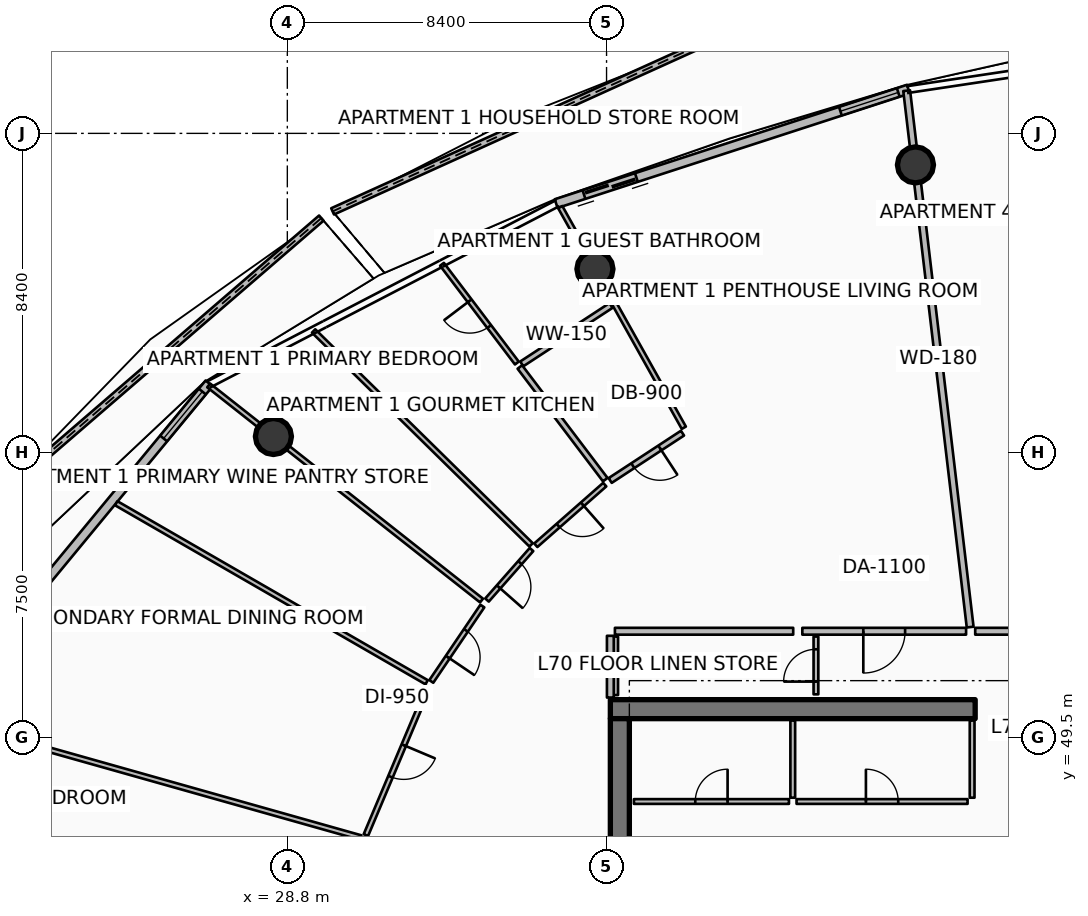
"""IFC4 building model, lengths in metres.
Left out: names, types, materials, properties, quantities, classifications, styles, units other than length and angle.
Written with IfcOpenShell. Run it as: python <this file> out.ifc"""

import sys

from ifc_helpers import new_model, si_unit, direction, frame, frame_2d, origin, origin_2d, place, context, subcontext, project, spatial, polyline, rectangle, circle, outline, extrude, element, fill, save


model = new_model("IFC4")
c1 = context("Model", 3, precision=1e-05, world=origin(), true_north=direction((0.0, 1.0)))
c2 = subcontext(c1, "Body", "Model", "MODEL_VIEW")
j1 = project(units=[si_unit("LENGTHUNIT", "METRE"), si_unit("PLANEANGLEUNIT", "RADIAN")], contexts=[c1])
p1 = place(None, origin())
s1 = spatial("IfcSite", under=j1, at=p1, CompositionType="ELEMENT")
p2 = place(p1, origin())
s2 = spatial("IfcBuilding", under=s1, at=p2, CompositionType="ELEMENT")
p3 = place(p2, frame((0.0, 0.0, 279.05)))
s3 = spatial("IfcBuildingStorey", under=s2, at=p3, CompositionType="ELEMENT", Elevation=279.05)
p4 = place(p3, frame((37.3, 50.25, 0.0), z_axis=(0.0, 0.0, 1.0), x_axis=(1.0, 0.0, 0.0)))
e1 = element("IfcWall", 1, at=p4, inside=s3, PredefinedType="SHEAR", context=c2, shape_type="SweptSolid", body=[
    extrude(rectangle(XDim=9.6, YDim=0.5, at=frame_2d((4.8, 0.0))), origin(), (0.0, 0.0, 1.0), 3.85),
])
p5 = place(p3, frame((37.55, 34.0, 0.0), z_axis=(0.0, 0.0, 1.0), x_axis=(0.0, 1.0, 0.0)))
e2 = element("IfcWall", 2, at=p5, inside=s3, PredefinedType="SHEAR", context=c2, shape_type="SweptSolid", body=[
    extrude(rectangle(XDim=16.0, YDim=0.5, at=frame_2d((8.0, 0.0))), origin(), (0.0, 0.0, 1.0), 3.85),
])
for number, where, z_axis, x_axis in (
    (3, (45.329, 64.571, 0.0), (0.0, 0.0, 1.0), (1.0, 0.0, 0.0)),
    (4, (36.895, 61.83, 0.0), (0.0, 0.0, 1.0), (1.0, 0.0, 0.0)),
    (5, (28.434, 57.425, 0.0), (0.0, 0.0, 1.0), (1.0, 0.0, 0.0)),
):
    element("IfcColumn", number, at=place(p3, frame(where, z_axis=z_axis, x_axis=x_axis)), inside=s3, PredefinedType="COLUMN", context=c2, shape_type="SweptSolid", body=[
        extrude(circle(Radius=0.475, at=origin_2d()), origin(), (0.0, 0.0, 1.0), 3.59),
    ])
p6 = place(p3, frame((39.534, 67.67, 0.0), z_axis=(0.0, 0.0, 1.0), x_axis=(-0.910900469726, -0.412626143444, 0.0)))
e6 = element("IfcWall", 6, at=p6, inside=s3, PredefinedType="PARAPET", context=c2, shape_type="SweptSolid", body=[
    extrude(outline(polyline([(0.0, 0.0), (10.476, 0.0), (10.476, 1.497), (5.238, 1.696), (0.0, 1.832), (0.0, 0.0)])), frame((0.0, 0.09, 0.0), z_axis=(0.0, -1.0, 0.0), x_axis=(1.0, 0.0, 0.0)), (0.0, 0.0, 1.0), 0.18),
])
p7 = place(p3, frame((29.694, 63.17, 0.0), z_axis=(0.0, 0.0, 1.0), x_axis=(-0.757188428153, -0.653196512751, 0.0)))
e7 = element("IfcWall", 7, at=p7, inside=s3, PredefinedType="PARAPET", context=c2, shape_type="SweptSolid", body=[
    extrude(outline(polyline([(0.0, 0.0), (11.278, 0.0), (11.278, 1.148), (5.639, 1.284), (0.0, 1.483), (0.0, 0.0)])), frame((0.0, 0.09, 0.0), z_axis=(0.0, -1.0, 0.0), x_axis=(1.0, 0.0, 0.0)), (0.0, 0.0, 1.0), 0.18),
])
p8 = place(p3, frame((45.142, 66.564, 0.0), z_axis=(0.0, 0.0, 1.0), x_axis=(-0.951055974609, -0.309018661507, 0.0)))
e8 = element("IfcWall", 8, at=p8, inside=s3, PredefinedType="SOLIDWALL", context=c2, shape_type="SweptSolid", body=[
    extrude(rectangle(XDim=9.745, YDim=0.24, at=frame_2d((4.873, 0.0))), origin(), (0.0, 0.0, 1.0), 2.54),
])
p9 = place(p8, frame((7.525, 0.0, 0.0)))
e9 = element("IfcOpeningElement", 9, at=p9, cuts=e8, PredefinedType="OPENING", context=c2, shape_type="SweptSolid", body=[
    extrude(rectangle(XDim=1.45, YDim=2.15, at=frame_2d((0.725, 1.075))), frame((0.0, 0.13, 0.0), z_axis=(0.0, -1.0, 0.0), x_axis=(1.0, 0.0, 0.0)), (0.0, 0.0, 1.0), 0.26),
])
p10 = place(p8, frame((0.28, 0.0, 0.65)))
e10 = element("IfcOpeningElement", 10, at=p10, cuts=e8, PredefinedType="OPENING", context=c2, shape_type="SweptSolid", body=[
    extrude(rectangle(XDim=1.6, YDim=1.5, at=frame_2d((0.8, 0.75))), frame((0.0, 0.13, 0.0), z_axis=(0.0, -1.0, 0.0), x_axis=(1.0, 0.0, 0.0)), (0.0, 0.0, 1.0), 0.26),
])
p11 = place(p3, frame((26.742, 58.822, 0.0), z_axis=(0.0, 0.0, 1.0), x_axis=(-0.636680093065, -0.771128043255, 0.0)))
e11 = element("IfcWall", 11, at=p11, inside=s3, PredefinedType="SOLIDWALL", context=c2, shape_type="SweptSolid", body=[
    extrude(rectangle(XDim=11.438, YDim=0.24, at=frame_2d((5.719, 0.0))), origin(), (0.0, 0.0, 1.0), 2.54),
])
p12 = place(p11, frame((9.218, 0.0, 0.0)))
e12 = element("IfcOpeningElement", 12, at=p12, cuts=e11, PredefinedType="OPENING", context=c2, shape_type="SweptSolid", body=[
    extrude(rectangle(XDim=1.45, YDim=2.15, at=frame_2d((0.725, 1.075))), frame((0.0, 0.13, 0.0), z_axis=(0.0, -1.0, 0.0), x_axis=(1.0, 0.0, 0.0)), (0.0, 0.0, 1.0), 0.26),
])
p13 = place(p11, frame((0.28, 0.0, 0.65)))
e13 = element("IfcOpeningElement", 13, at=p13, cuts=e11, PredefinedType="OPENING", context=c2, shape_type="SweptSolid", body=[
    extrude(rectangle(XDim=1.6, YDim=1.5, at=frame_2d((0.8, 0.75))), frame((0.0, 0.13, 0.0), z_axis=(0.0, -1.0, 0.0), x_axis=(1.0, 0.0, 0.0)), (0.0, 0.0, 1.0), 0.26),
])
for number, where, z_axis, x_axis in (
    (14, (46.82, 47.92, 0.0), (0.0, 0.0, 1.0), (0.0, 1.0, 0.0)),
    (15, (42.1, 47.92, 0.0), (0.0, 0.0, 1.0), (0.0, 1.0, 0.0)),
):
    element("IfcWall", number, at=place(p3, frame(where, z_axis=z_axis, x_axis=x_axis)), inside=s3, PredefinedType="PARTITIONING", context=c2, shape_type="SweptSolid", body=[
        extrude(rectangle(XDim=2.03, YDim=0.125, at=frame_2d((1.015, 0.0))), origin(), (0.0, 0.0, 1.0), 3.03),
    ])
p14 = place(p3, frame((37.92, 47.82, 0.0), z_axis=(0.0, 0.0, 1.0), x_axis=(1.0, 0.0, 0.0)))
e16 = element("IfcWall", 16, at=p14, inside=s3, PredefinedType="PARTITIONING", context=c2, shape_type="SweptSolid", body=[
    extrude(rectangle(XDim=4.08, YDim=0.125, at=frame_2d((2.04, 0.0))), origin(), (0.0, 0.0, 1.0), 3.03),
])
p15 = place(p14, frame((1.615, 0.0, 0.0)))
e17 = element("IfcOpeningElement", 17, at=p15, cuts=e16, PredefinedType="OPENING", context=c2, shape_type="SweptSolid", body=[
    extrude(rectangle(XDim=0.85, YDim=2.06, at=frame_2d((0.425, 1.03))), frame((0.0, 0.073, 0.0), z_axis=(0.0, -1.0, 0.0), x_axis=(1.0, 0.0, 0.0)), (0.0, 0.0, 1.0), 0.145),
])
p16 = place(p3, frame((42.2, 47.82, 0.0), z_axis=(0.0, 0.0, 1.0), x_axis=(1.0, 0.0, 0.0)))
e18 = element("IfcWall", 18, at=p16, inside=s3, PredefinedType="PARTITIONING", context=c2, shape_type="SweptSolid", body=[
    extrude(rectangle(XDim=4.5, YDim=0.125, at=frame_2d((2.25, 0.0))), origin(), (0.0, 0.0, 1.0), 3.03),
])
p17 = place(p16, frame((1.825, 0.0, 0.0)))
e19 = element("IfcOpeningElement", 19, at=p17, cuts=e18, PredefinedType="OPENING", context=c2, shape_type="SweptSolid", body=[
    extrude(rectangle(XDim=0.85, YDim=2.06, at=frame_2d((0.425, 1.03))), frame((0.0, 0.073, 0.0), z_axis=(0.0, -1.0, 0.0), x_axis=(1.0, 0.0, 0.0)), (0.0, 0.0, 1.0), 0.145),
])
p18 = place(p3, frame((37.44, 50.62, 0.0), z_axis=(0.0, 0.0, 1.0), x_axis=(0.0, 1.0, 0.0)))
e20 = element("IfcWall", 20, at=p18, inside=s3, PredefinedType="PARTITIONING", context=c2, shape_type="SweptSolid", body=[
    extrude(rectangle(XDim=1.54, YDim=0.125, at=frame_2d((0.77, 0.0))), origin(), (0.0, 0.0, 1.0), 3.03),
])
p19 = place(p3, frame((42.71, 50.64, 0.0), z_axis=(0.0, 0.0, 1.0), x_axis=(0.0, 1.0, 0.0)))
e21 = element("IfcWall", 21, at=p19, inside=s3, PredefinedType="PARTITIONING", context=c2, shape_type="SweptSolid", body=[
    extrude(rectangle(XDim=1.52, YDim=0.125, at=frame_2d((0.76, 0.0))), origin(), (0.0, 0.0, 1.0), 2.957),
])
p20 = place(p19, frame((0.335, 0.0, 0.0)))
e22 = element("IfcOpeningElement", 22, at=p20, cuts=e21, PredefinedType="OPENING", context=c2, shape_type="SweptSolid", body=[
    extrude(rectangle(XDim=0.85, YDim=2.06, at=frame_2d((0.425, 1.03))), frame((0.0, 0.073, 0.0), z_axis=(0.0, -1.0, 0.0), x_axis=(1.0, 0.0, 0.0)), (0.0, 0.0, 1.0), 0.145),
])
p21 = place(p3, frame((46.768, 52.409, 0.0), z_axis=(0.0, 0.0, 1.0), x_axis=(-0.117545848714, 0.993067456646, 0.0)))
e23 = element("IfcWall", 23, at=p21, inside=s3, PredefinedType="PARTITIONING", context=c2, shape_type="SweptSolid", body=[
    extrude(rectangle(XDim=14.213, YDim=0.18, at=frame_2d((7.106, 0.0))), origin(), (0.0, 0.0, 1.0), 2.957),
])
p22 = place(p3, frame((46.661, 52.3, 0.0), z_axis=(0.0, 0.0, 1.0), x_axis=(-1.0, 0.0, 0.0)))
e24 = element("IfcWall", 24, at=p22, inside=s3, PredefinedType="PARTITIONING", context=c2, shape_type="SweptSolid", body=[
    extrude(rectangle(XDim=4.309, YDim=0.18, at=frame_2d((2.155, 0.0))), origin(), (0.0, 0.0, 1.0), 2.957),
])
p23 = place(p22, frame((1.604, 0.0, 0.0)))
e25 = element("IfcOpeningElement", 25, at=p23, cuts=e24, PredefinedType="OPENING", context=c2, shape_type="SweptSolid", body=[
    extrude(rectangle(XDim=1.1, YDim=2.1, at=frame_2d((0.55, 1.05))), frame((0.0, 0.1, 0.0), z_axis=(0.0, -1.0, 0.0), x_axis=(1.0, 0.0, 0.0)), (0.0, 0.0, 1.0), 0.2),
])
p24 = place(p3, frame((42.112, 52.3, 0.0), z_axis=(0.0, 0.0, 1.0), x_axis=(-1.0, 0.0, 0.0)))
e26 = element("IfcWall", 26, at=p24, inside=s3, PredefinedType="PARTITIONING", context=c2, shape_type="SweptSolid", body=[
    extrude(rectangle(XDim=4.692, YDim=0.18, at=frame_2d((2.346, 0.0))), origin(), (0.0, 0.0, 1.0), 2.957),
])
p25 = place(p3, frame((37.3, 52.18, 0.0), z_axis=(0.0, 0.0, 1.0), x_axis=(0.0, -1.0, 0.0)))
e27 = element("IfcWall", 27, at=p25, inside=s3, PredefinedType="PARTITIONING", context=c2, shape_type="SweptSolid", body=[
    extrude(rectangle(XDim=1.625, YDim=0.18, at=frame_2d((0.812, 0.0))), origin(), (0.0, 0.0, 1.0), 2.957),
])
p26 = place(p3, frame((39.233, 57.654, 0.0), z_axis=(0.0, 0.0, 1.0), x_axis=(-0.488631305502, 0.872490370883, 0.0)))
e28 = element("IfcWall", 28, at=p26, inside=s3, PredefinedType="PARTITIONING", context=c2, shape_type="SweptSolid", body=[
    extrude(rectangle(XDim=6.653, YDim=0.125, at=frame_2d((3.326, 0.0))), origin(), (0.0, 0.0, 1.0), 2.957),
])
p27 = place(p3, frame((39.198, 57.512, 0.0), z_axis=(0.0, 0.0, 1.0), x_axis=(-0.836678262568, -0.547694700491, 0.0)))
e29 = element("IfcWall", 29, at=p27, inside=s3, PredefinedType="PARTITIONING", context=c2, shape_type="SweptSolid", body=[
    extrude(rectangle(XDim=2.274, YDim=0.15, at=frame_2d((1.137, 0.0))), origin(), (0.0, 0.0, 1.0), 2.957),
])
p28 = place(p27, frame((0.712, 0.0, 0.0)))
e30 = element("IfcOpeningElement", 30, at=p28, cuts=e29, PredefinedType="OPENING", context=c2, shape_type="SweptSolid", body=[
    extrude(rectangle(XDim=0.85, YDim=2.06, at=frame_2d((0.425, 1.03))), frame((0.0, 0.085, 0.0), z_axis=(0.0, -1.0, 0.0), x_axis=(1.0, 0.0, 0.0)), (0.0, 0.0, 1.0), 0.17),
])
p29 = place(p3, frame((37.317, 60.871, 0.0), z_axis=(0.0, 0.0, 1.0), x_axis=(-0.836665995214, -0.547713440087, 0.0)))
e31 = element("IfcWall", 31, at=p29, inside=s3, PredefinedType="PARTITIONING", context=c2, shape_type="SweptSolid", body=[
    extrude(rectangle(XDim=2.806, YDim=0.15, at=frame_2d((1.403, 0.0))), origin(), (0.0, 0.0, 1.0), 2.957),
])
p30 = place(p3, frame((37.166, 56.289, 0.0), z_axis=(0.0, 0.0, 1.0), x_axis=(-0.604171001441, 0.796854692537, 0.0)))
e32 = element("IfcWall", 32, at=p30, inside=s3, PredefinedType="PARTITIONING", context=c2, shape_type="SweptSolid", body=[
    extrude(rectangle(XDim=3.72, YDim=0.15, at=frame_2d((1.86, 0.0))), origin(), (0.0, 0.0, 1.0), 3.03),
])
p31 = place(p3, frame((34.84, 59.357, 0.0), z_axis=(0.0, 0.0, 1.0), x_axis=(-0.604173390314, 0.7968528813, 0.0)))
e33 = element("IfcWall", 33, at=p31, inside=s3, PredefinedType="PARTITIONING", context=c2, shape_type="SweptSolid", body=[
    extrude(rectangle(XDim=3.26, YDim=0.125, at=frame_2d((1.63, 0.0))), origin(), (0.0, 0.0, 1.0), 3.03),
])
p32 = place(p31, frame((1.205, 0.0, 0.0)))
e34 = element("IfcOpeningElement", 34, at=p32, cuts=e33, PredefinedType="OPENING", context=c2, shape_type="SweptSolid", body=[
    extrude(rectangle(XDim=0.85, YDim=2.06, at=frame_2d((0.425, 1.03))), frame((0.0, 0.073, 0.0), z_axis=(0.0, -1.0, 0.0), x_axis=(1.0, 0.0, 0.0)), (0.0, 0.0, 1.0), 0.145),
])
p33 = place(p3, frame((35.214, 54.573, 0.0), z_axis=(0.0, 0.0, 1.0), x_axis=(-0.712998082221, 0.701165982311, 0.0)))
e35 = element("IfcWall", 35, at=p33, inside=s3, PredefinedType="PARTITIONING", context=c2, shape_type="SweptSolid", body=[
    extrude(rectangle(XDim=8.027, YDim=0.125, at=frame_2d((4.013, 0.0))), origin(), (0.0, 0.0, 1.0), 3.03),
])
p34 = place(p3, frame((37.153, 56.158, 0.0), z_axis=(0.0, 0.0, 1.0), x_axis=(-0.750978090344, -0.660327121829, 0.0)))
e36 = element("IfcWall", 36, at=p34, inside=s3, PredefinedType="PARTITIONING", context=c2, shape_type="SweptSolid", body=[
    extrude(rectangle(XDim=2.416, YDim=0.125, at=frame_2d((1.208, 0.0))), origin(), (0.0, 0.0, 1.0), 3.03),
])
p35 = place(p34, frame((0.783, 0.0, 0.0)))
e37 = element("IfcOpeningElement", 37, at=p35, cuts=e36, PredefinedType="OPENING", context=c2, shape_type="SweptSolid", body=[
    extrude(rectangle(XDim=0.85, YDim=2.06, at=frame_2d((0.425, 1.03))), frame((0.0, 0.073, 0.0), z_axis=(0.0, -1.0, 0.0), x_axis=(1.0, 0.0, 0.0)), (0.0, 0.0, 1.0), 0.145),
])
p36 = place(p3, frame((35.226, 54.45, 0.0), z_axis=(0.0, 0.0, 1.0), x_axis=(-0.661115526194, -0.7502841202, 0.0)))
e38 = element("IfcWall", 38, at=p36, inside=s3, PredefinedType="PARTITIONING", context=c2, shape_type="SweptSolid", body=[
    extrude(rectangle(XDim=1.771, YDim=0.125, at=frame_2d((0.886, 0.0))), origin(), (0.0, 0.0, 1.0), 2.957),
])
p37 = place(p36, frame((0.461, 0.0, 0.0)))
e39 = element("IfcOpeningElement", 39, at=p37, cuts=e38, PredefinedType="OPENING", context=c2, shape_type="SweptSolid", body=[
    extrude(rectangle(XDim=0.85, YDim=2.06, at=frame_2d((0.425, 1.03))), frame((0.0, 0.073, 0.0), z_axis=(0.0, -1.0, 0.0), x_axis=(1.0, 0.0, 0.0)), (0.0, 0.0, 1.0), 0.145),
])
p38 = place(p3, frame((33.91, 53.108, 0.0), z_axis=(0.0, 0.0, 1.0), x_axis=(-0.785332331122, 0.619074413697, 0.0)))
e40 = element("IfcWall", 40, at=p38, inside=s3, PredefinedType="PARTITIONING", context=c2, shape_type="SweptSolid", body=[
    extrude(rectangle(XDim=9.143, YDim=0.125, at=frame_2d((4.571, 0.0))), origin(), (0.0, 0.0, 1.0), 2.957),
])
p39 = place(p3, frame((32.466, 50.958, 0.0), z_axis=(0.0, 0.0, 1.0), x_axis=(-0.86629721787, 0.499528908383, 0.0)))
e41 = element("IfcWall", 41, at=p39, inside=s3, PredefinedType="PARTITIONING", context=c2, shape_type="SweptSolid", body=[
    extrude(rectangle(XDim=9.428, YDim=0.125, at=frame_2d((4.714, 0.0))), origin(), (0.0, 0.0, 1.0), 3.03),
])
p40 = place(p3, frame((33.932, 52.963, 0.0), z_axis=(0.0, 0.0, 1.0), x_axis=(-0.560751274748, -0.82798430412, 0.0)))
e42 = element("IfcWall", 42, at=p40, inside=s3, PredefinedType="PARTITIONING", context=c2, shape_type="SweptSolid", body=[
    extrude(rectangle(XDim=2.396, YDim=0.125, at=frame_2d((1.198, 0.0))), origin(), (0.0, 0.0, 1.0), 2.957),
])
p41 = place(p40, frame((0.773, 0.0, 0.0)))
e43 = element("IfcOpeningElement", 43, at=p41, cuts=e42, PredefinedType="OPENING", context=c2, shape_type="SweptSolid", body=[
    extrude(rectangle(XDim=0.85, YDim=2.06, at=frame_2d((0.425, 1.03))), frame((0.0, 0.073, 0.0), z_axis=(0.0, -1.0, 0.0), x_axis=(1.0, 0.0, 0.0)), (0.0, 0.0, 1.0), 0.145),
])
p42 = place(p3, frame((32.513, 50.839, 0.0), z_axis=(0.0, 0.0, 1.0), x_axis=(-0.388494891754, -0.921450877194, 0.0)))
e44 = element("IfcWall", 44, at=p42, inside=s3, PredefinedType="PARTITIONING", context=c2, shape_type="SweptSolid", body=[
    extrude(rectangle(XDim=4.237, YDim=0.125, at=frame_2d((2.118, 0.0))), origin(), (0.0, 0.0, 1.0), 2.957),
])
p43 = place(p42, frame((1.668, 0.0, 0.0)))
e45 = element("IfcOpeningElement", 45, at=p43, cuts=e44, PredefinedType="OPENING", context=c2, shape_type="SweptSolid", body=[
    extrude(rectangle(XDim=0.9, YDim=2.08, at=frame_2d((0.45, 1.04))), frame((0.0, 0.073, 0.0), z_axis=(0.0, -1.0, 0.0), x_axis=(1.0, 0.0, 0.0)), (0.0, 0.0, 1.0), 0.145),
])
p44 = place(p3, frame((30.732, 46.87, 0.0), z_axis=(0.0, 0.0, 1.0), x_axis=(-0.962452931787, 0.271448621462, 0.0)))
e46 = element("IfcWall", 46, at=p44, inside=s3, PredefinedType="PARTITIONING", context=c2, shape_type="SweptSolid", body=[
    extrude(rectangle(XDim=11.554, YDim=0.125, at=frame_2d((5.777, 0.0))), origin(), (0.0, 0.0, 1.0), 2.957),
])
p45 = place(p3, frame((50.785, 52.3, 0.0), z_axis=(0.0, 0.0, 1.0), x_axis=(-1.0, 0.0, 0.0)))
e47 = element("IfcWall", 47, at=p45, inside=s3, PredefinedType="PARTITIONING", context=c2, shape_type="SweptSolid", body=[
    extrude(rectangle(XDim=3.884, YDim=0.18, at=frame_2d((1.942, 0.0))), origin(), (0.0, 0.0, 1.0), 2.957),
])
p46 = place(p45, frame((1.392, 0.0, 0.0)))
e48 = element("IfcOpeningElement", 48, at=p46, cuts=e47, PredefinedType="OPENING", context=c2, shape_type="SweptSolid", body=[
    extrude(rectangle(XDim=1.1, YDim=2.1, at=frame_2d((0.55, 1.05))), frame((0.0, 0.1, 0.0), z_axis=(0.0, -1.0, 0.0), x_axis=(1.0, 0.0, 0.0)), (0.0, 0.0, 1.0), 0.2),
])
p47 = place(p9, origin())
e49 = element("IfcDoor", 49, at=p47, inside=s3, OperationType="DOUBLE_DOOR_SLIDING", PredefinedType="DOOR", context=c2, shape_type="SweptSolid", body=[
    extrude(rectangle(XDim=1.45, YDim=2.15, at=frame_2d((0.725, 1.075))), frame((0.0, 0.025, 0.0), z_axis=(0.0, -1.0, 0.0), x_axis=(1.0, 0.0, 0.0)), (0.0, 0.0, 1.0), 0.05),
])
fill(e9, e49)
p48 = place(p10, origin())
e50 = element("IfcWindow", 50, at=p48, inside=s3, PartitioningType="SINGLE_PANEL", PredefinedType="WINDOW", context=c2, shape_type="SweptSolid", body=[
    extrude(rectangle(XDim=1.6, YDim=1.5, at=frame_2d((0.8, 0.75))), frame((0.0, 0.03, 0.0), z_axis=(0.0, -1.0, 0.0), x_axis=(1.0, 0.0, 0.0)), (0.0, 0.0, 1.0), 0.06),
])
fill(e10, e50)
p49 = place(p13, origin())
e51 = element("IfcWindow", 51, at=p49, inside=s3, PartitioningType="SINGLE_PANEL", PredefinedType="WINDOW", context=c2, shape_type="SweptSolid", body=[
    extrude(rectangle(XDim=1.6, YDim=1.5, at=frame_2d((0.8, 0.75))), frame((0.0, 0.03, 0.0), z_axis=(0.0, -1.0, 0.0), x_axis=(1.0, 0.0, 0.0)), (0.0, 0.0, 1.0), 0.06),
])
fill(e13, e51)
p50 = place(p15, origin())
e52 = element("IfcDoor", 52, at=p50, inside=s3, OperationType="SINGLE_SWING_RIGHT", PredefinedType="DOOR", context=c2, shape_type="SweptSolid", body=[
    extrude(rectangle(XDim=0.85, YDim=2.06, at=frame_2d((0.425, 1.03))), frame((0.0, 0.025, 0.0), z_axis=(0.0, -1.0, 0.0), x_axis=(1.0, 0.0, 0.0)), (0.0, 0.0, 1.0), 0.05),
])
fill(e17, e52)
p51 = place(p17, origin())
e53 = element("IfcDoor", 53, at=p51, inside=s3, OperationType="SINGLE_SWING_LEFT", PredefinedType="DOOR", context=c2, shape_type="SweptSolid", body=[
    extrude(rectangle(XDim=0.85, YDim=2.06, at=frame_2d((0.425, 1.03))), frame((0.0, 0.025, 0.0), z_axis=(0.0, -1.0, 0.0), x_axis=(1.0, 0.0, 0.0)), (0.0, 0.0, 1.0), 0.05),
])
fill(e19, e53)
p52 = place(p20, origin())
e54 = element("IfcDoor", 54, at=p52, inside=s3, OperationType="SINGLE_SWING_LEFT", PredefinedType="DOOR", context=c2, shape_type="SweptSolid", body=[
    extrude(rectangle(XDim=0.85, YDim=2.06, at=frame_2d((0.425, 1.03))), frame((0.0, 0.025, 0.0), z_axis=(0.0, -1.0, 0.0), x_axis=(1.0, 0.0, 0.0)), (0.0, 0.0, 1.0), 0.05),
])
fill(e22, e54)
p53 = place(p23, origin())
e55 = element("IfcDoor", 55, at=p53, inside=s3, OperationType="SINGLE_SWING_RIGHT", PredefinedType="DOOR", context=c2, shape_type="SweptSolid", body=[
    extrude(rectangle(XDim=1.1, YDim=2.1, at=frame_2d((0.55, 1.05))), frame((0.0, 0.025, 0.0), z_axis=(0.0, -1.0, 0.0), x_axis=(1.0, 0.0, 0.0)), (0.0, 0.0, 1.0), 0.05),
])
fill(e25, e55)
p54 = place(p28, origin())
e56 = element("IfcDoor", 56, at=p54, inside=s3, OperationType="SINGLE_SWING_LEFT", PredefinedType="DOOR", context=c2, shape_type="SweptSolid", body=[
    extrude(rectangle(XDim=0.85, YDim=2.06, at=frame_2d((0.425, 1.03))), frame((0.0, 0.025, 0.0), z_axis=(0.0, -1.0, 0.0), x_axis=(1.0, 0.0, 0.0)), (0.0, 0.0, 1.0), 0.05),
])
fill(e30, e56)
p55 = place(p32, origin())
e57 = element("IfcDoor", 57, at=p55, inside=s3, OperationType="SINGLE_SWING_RIGHT", PredefinedType="DOOR", context=c2, shape_type="SweptSolid", body=[
    extrude(rectangle(XDim=0.85, YDim=2.06, at=frame_2d((0.425, 1.03))), frame((0.0, 0.025, 0.0), z_axis=(0.0, -1.0, 0.0), x_axis=(1.0, 0.0, 0.0)), (0.0, 0.0, 1.0), 0.05),
])
fill(e34, e57)
p56 = place(p35, origin())
e58 = element("IfcDoor", 58, at=p56, inside=s3, OperationType="SINGLE_SWING_LEFT", PredefinedType="DOOR", context=c2, shape_type="SweptSolid", body=[
    extrude(rectangle(XDim=0.85, YDim=2.06, at=frame_2d((0.425, 1.03))), frame((0.0, 0.025, 0.0), z_axis=(0.0, -1.0, 0.0), x_axis=(1.0, 0.0, 0.0)), (0.0, 0.0, 1.0), 0.05),
])
fill(e37, e58)
p57 = place(p37, origin())
e59 = element("IfcDoor", 59, at=p57, inside=s3, OperationType="SINGLE_SWING_RIGHT", PredefinedType="DOOR", context=c2, shape_type="SweptSolid", body=[
    extrude(rectangle(XDim=0.85, YDim=2.06, at=frame_2d((0.425, 1.03))), frame((0.0, 0.025, 0.0), z_axis=(0.0, -1.0, 0.0), x_axis=(1.0, 0.0, 0.0)), (0.0, 0.0, 1.0), 0.05),
])
fill(e39, e59)
p58 = place(p41, origin())
e60 = element("IfcDoor", 60, at=p58, inside=s3, OperationType="SINGLE_SWING_RIGHT", PredefinedType="DOOR", context=c2, shape_type="SweptSolid", body=[
    extrude(rectangle(XDim=0.85, YDim=2.06, at=frame_2d((0.425, 1.03))), frame((0.0, 0.025, 0.0), z_axis=(0.0, -1.0, 0.0), x_axis=(1.0, 0.0, 0.0)), (0.0, 0.0, 1.0), 0.05),
])
fill(e43, e60)
p59 = place(p43, origin())
e61 = element("IfcDoor", 61, at=p59, inside=s3, OperationType="SINGLE_SWING_LEFT", PredefinedType="DOOR", context=c2, shape_type="SweptSolid", body=[
    extrude(rectangle(XDim=0.9, YDim=2.08, at=frame_2d((0.45, 1.04))), frame((0.0, 0.025, 0.0), z_axis=(0.0, -1.0, 0.0), x_axis=(1.0, 0.0, 0.0)), (0.0, 0.0, 1.0), 0.05),
])
fill(e45, e61)
save(model, sys.argv[1])
